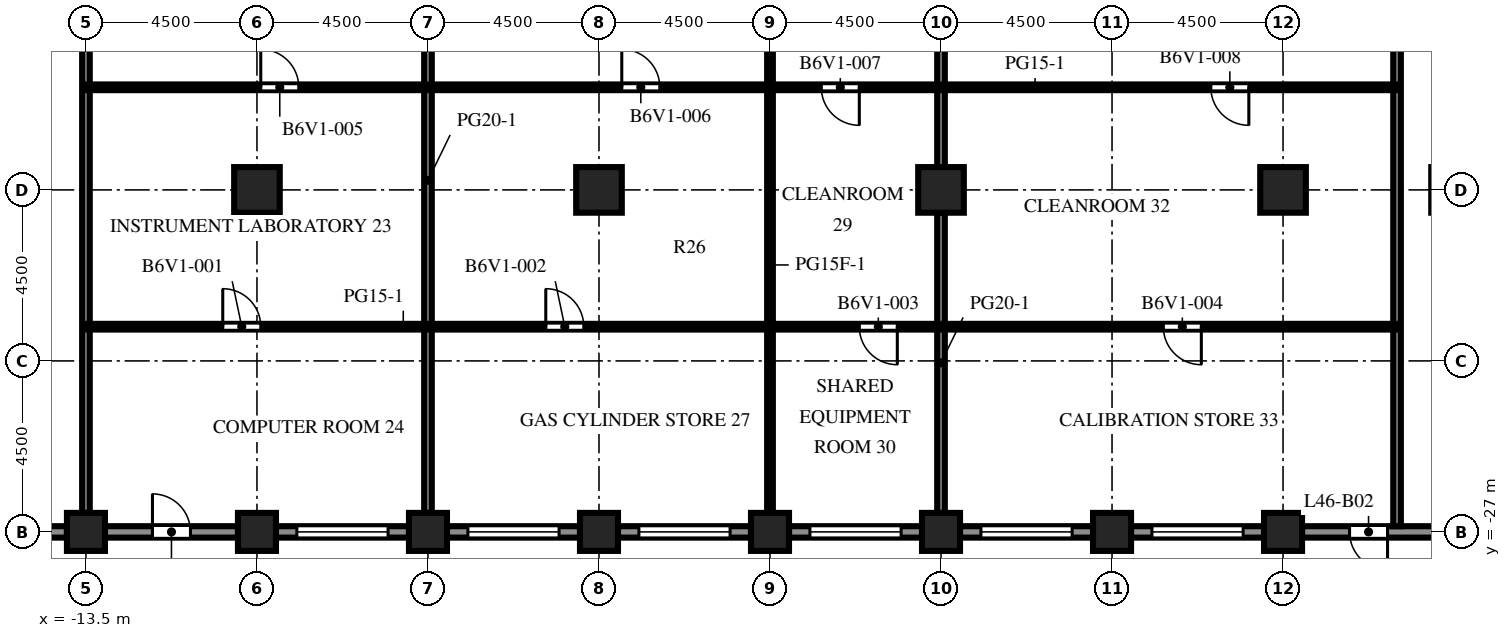
"""IFC4 building model, lengths in metres.
Left out: names, types, materials, properties, quantities, classifications, styles, units other than length and angle.
Written with IfcOpenShell. Run it as: python <this file> out.ifc"""

import sys

from ifc_helpers import new_model, si_unit, direction, frame, frame_2d, origin, origin_2d, place, context, subcontext, project, spatial, rectangle, extrude, element, fill, save


model = new_model("IFC4")
c1 = context("Model", 3, precision=1e-05, world=origin(), true_north=direction((0.0, 1.0)))
c2 = subcontext(c1, "Body", "Model", "MODEL_VIEW")
j1 = project(units=[si_unit("LENGTHUNIT", "METRE"), si_unit("PLANEANGLEUNIT", "RADIAN")], contexts=[c1])
p1 = place(None, origin())
s1 = spatial("IfcSite", under=j1, at=p1, CompositionType="ELEMENT")
p2 = place(p1, origin())
s2 = spatial("IfcBuilding", under=s1, at=p2, CompositionType="ELEMENT")
p3 = place(p2, frame((0.0, 0.0, 203.8)))
s3 = spatial("IfcBuildingStorey", under=s2, at=p3, CompositionType="ELEMENT", Elevation=203.8)
for number, where, z_axis, x_axis in (
    (1, (-13.5, -27.0, 0.0), (0.0, 0.0, 1.0), (1.0, 0.0, 0.0)),
    (2, (-9.0, -27.0, 0.0), (0.0, 0.0, 1.0), (1.0, 0.0, 0.0)),
    (3, (-4.5, -27.0, 0.0), (0.0, 0.0, 1.0), (1.0, 0.0, 0.0)),
    (4, (0.0, -27.0, 0.0), (0.0, 0.0, 1.0), (1.0, 0.0, 0.0)),
    (5, (4.5, -27.0, 0.0), (0.0, 0.0, 1.0), (1.0, 0.0, 0.0)),
    (6, (9.0, -27.0, 0.0), (0.0, 0.0, 1.0), (1.0, 0.0, 0.0)),
    (7, (13.5, -27.0, 0.0), (0.0, 0.0, 1.0), (1.0, 0.0, 0.0)),
    (8, (18.0, -27.0, 0.0), (0.0, 0.0, 1.0), (1.0, 0.0, 0.0)),
):
    element("IfcColumn", number, at=place(p3, frame(where, z_axis=z_axis, x_axis=x_axis)), inside=s3, PredefinedType="COLUMN", context=c2, shape_type="SweptSolid", body=[
        extrude(rectangle(XDim=1.0, YDim=1.0, at=origin_2d()), origin(), (0.0, 0.0, 1.0), 4.1),
    ])
for number, where, z_axis, x_axis in (
    (9, (-9.0, -18.0, 0.0), (0.0, 0.0, 1.0), (1.0, 0.0, 0.0)),
    (10, (0.0, -18.0, 0.0), (0.0, 0.0, 1.0), (1.0, 0.0, 0.0)),
    (11, (9.0, -18.0, 0.0), (0.0, 0.0, 1.0), (1.0, 0.0, 0.0)),
    (12, (18.0, -18.0, 0.0), (0.0, 0.0, 1.0), (1.0, 0.0, 0.0)),
):
    element("IfcColumn", number, at=place(p3, frame(where, z_axis=z_axis, x_axis=x_axis)), inside=s3, PredefinedType="COLUMN", context=c2, shape_type="SweptSolid", body=[
        extrude(rectangle(XDim=1.2, YDim=1.2, at=origin_2d()), origin(), (0.0, 0.0, 1.0), 4.1),
    ])
p4 = place(p3, frame((-14.0, -27.0, 0.0), z_axis=(0.0, 0.0, 1.0), x_axis=(-1.0, 0.0, 0.0)))
e13 = element("IfcWall", 13, at=p4, inside=s3, PredefinedType="SOLIDWALL", context=c2, shape_type="SweptSolid", body=[
    extrude(rectangle(XDim=3.5, YDim=0.3, at=frame_2d((1.75, 0.0))), origin(), (0.0, 0.0, 1.0), 2.85),
])
p5 = place(p4, frame((0.55, 0.0, 0.8)))
e14 = element("IfcOpeningElement", 14, at=p5, cuts=e13, PredefinedType="OPENING", context=c2, shape_type="SweptSolid", body=[
    extrude(rectangle(XDim=2.4, YDim=1.7, at=frame_2d((1.2, 0.85))), frame((0.0, 0.16, 0.0), z_axis=(0.0, -1.0, 0.0), x_axis=(1.0, 0.0, 0.0)), (0.0, 0.0, 1.0), 0.32),
])
p6 = place(p3, frame((-9.5, -27.0, 0.0), z_axis=(0.0, 0.0, 1.0), x_axis=(-1.0, 0.0, 0.0)))
e15 = element("IfcWall", 15, at=p6, inside=s3, PredefinedType="SOLIDWALL", context=c2, shape_type="SweptSolid", body=[
    extrude(rectangle(XDim=3.5, YDim=0.3, at=frame_2d((1.75, 0.0))), origin(), (0.0, 0.0, 1.0), 2.85),
])
p7 = place(p6, frame((1.25, 0.0, 0.0)))
e16 = element("IfcOpeningElement", 16, at=p7, cuts=e15, PredefinedType="OPENING", context=c2, shape_type="SweptSolid", body=[
    extrude(rectangle(XDim=1.0, YDim=2.2, at=frame_2d((0.5, 1.1))), frame((0.0, 0.16, 0.0), z_axis=(0.0, -1.0, 0.0), x_axis=(1.0, 0.0, 0.0)), (0.0, 0.0, 1.0), 0.32),
])
p8 = place(p3, frame((-5.0, -27.0, 0.0), z_axis=(0.0, 0.0, 1.0), x_axis=(-1.0, 0.0, 0.0)))
e17 = element("IfcWall", 17, at=p8, inside=s3, PredefinedType="SOLIDWALL", context=c2, shape_type="SweptSolid", body=[
    extrude(rectangle(XDim=3.5, YDim=0.3, at=frame_2d((1.75, 0.0))), origin(), (0.0, 0.0, 1.0), 2.85),
])
p9 = place(p8, frame((0.55, 0.0, 0.8)))
e18 = element("IfcOpeningElement", 18, at=p9, cuts=e17, PredefinedType="OPENING", context=c2, shape_type="SweptSolid", body=[
    extrude(rectangle(XDim=2.4, YDim=1.7, at=frame_2d((1.2, 0.85))), frame((0.0, 0.16, 0.0), z_axis=(0.0, -1.0, 0.0), x_axis=(1.0, 0.0, 0.0)), (0.0, 0.0, 1.0), 0.32),
])
p10 = place(p3, frame((-0.5, -27.0, 0.0), z_axis=(0.0, 0.0, 1.0), x_axis=(-1.0, 0.0, 0.0)))
e19 = element("IfcWall", 19, at=p10, inside=s3, PredefinedType="SOLIDWALL", context=c2, shape_type="SweptSolid", body=[
    extrude(rectangle(XDim=3.5, YDim=0.3, at=frame_2d((1.75, 0.0))), origin(), (0.0, 0.0, 1.0), 2.85),
])
p11 = place(p10, frame((0.55, 0.0, 0.8)))
e20 = element("IfcOpeningElement", 20, at=p11, cuts=e19, PredefinedType="OPENING", context=c2, shape_type="SweptSolid", body=[
    extrude(rectangle(XDim=2.4, YDim=1.7, at=frame_2d((1.2, 0.85))), frame((0.0, 0.16, 0.0), z_axis=(0.0, -1.0, 0.0), x_axis=(1.0, 0.0, 0.0)), (0.0, 0.0, 1.0), 0.32),
])
p12 = place(p3, frame((4.0, -27.0, 0.0), z_axis=(0.0, 0.0, 1.0), x_axis=(-1.0, 0.0, 0.0)))
e21 = element("IfcWall", 21, at=p12, inside=s3, PredefinedType="SOLIDWALL", context=c2, shape_type="SweptSolid", body=[
    extrude(rectangle(XDim=3.5, YDim=0.3, at=frame_2d((1.75, 0.0))), origin(), (0.0, 0.0, 1.0), 2.85),
])
p13 = place(p12, frame((0.55, 0.0, 0.8)))
e22 = element("IfcOpeningElement", 22, at=p13, cuts=e21, PredefinedType="OPENING", context=c2, shape_type="SweptSolid", body=[
    extrude(rectangle(XDim=2.4, YDim=1.7, at=frame_2d((1.2, 0.85))), frame((0.0, 0.16, 0.0), z_axis=(0.0, -1.0, 0.0), x_axis=(1.0, 0.0, 0.0)), (0.0, 0.0, 1.0), 0.32),
])
p14 = place(p3, frame((8.5, -27.0, 0.0), z_axis=(0.0, 0.0, 1.0), x_axis=(-1.0, 0.0, 0.0)))
e23 = element("IfcWall", 23, at=p14, inside=s3, PredefinedType="SOLIDWALL", context=c2, shape_type="SweptSolid", body=[
    extrude(rectangle(XDim=3.5, YDim=0.3, at=frame_2d((1.75, 0.0))), origin(), (0.0, 0.0, 1.0), 2.85),
])
p15 = place(p14, frame((0.55, 0.0, 0.8)))
e24 = element("IfcOpeningElement", 24, at=p15, cuts=e23, PredefinedType="OPENING", context=c2, shape_type="SweptSolid", body=[
    extrude(rectangle(XDim=2.4, YDim=1.7, at=frame_2d((1.2, 0.85))), frame((0.0, 0.16, 0.0), z_axis=(0.0, -1.0, 0.0), x_axis=(1.0, 0.0, 0.0)), (0.0, 0.0, 1.0), 0.32),
])
p16 = place(p3, frame((13.0, -27.0, 0.0), z_axis=(0.0, 0.0, 1.0), x_axis=(-1.0, 0.0, 0.0)))
e25 = element("IfcWall", 25, at=p16, inside=s3, PredefinedType="SOLIDWALL", context=c2, shape_type="SweptSolid", body=[
    extrude(rectangle(XDim=3.5, YDim=0.3, at=frame_2d((1.75, 0.0))), origin(), (0.0, 0.0, 1.0), 2.85),
])
p17 = place(p16, frame((0.55, 0.0, 0.8)))
e26 = element("IfcOpeningElement", 26, at=p17, cuts=e25, PredefinedType="OPENING", context=c2, shape_type="SweptSolid", body=[
    extrude(rectangle(XDim=2.4, YDim=1.7, at=frame_2d((1.2, 0.85))), frame((0.0, 0.16, 0.0), z_axis=(0.0, -1.0, 0.0), x_axis=(1.0, 0.0, 0.0)), (0.0, 0.0, 1.0), 0.32),
])
p18 = place(p3, frame((17.5, -27.0, 0.0), z_axis=(0.0, 0.0, 1.0), x_axis=(-1.0, 0.0, 0.0)))
e27 = element("IfcWall", 27, at=p18, inside=s3, PredefinedType="SOLIDWALL", context=c2, shape_type="SweptSolid", body=[
    extrude(rectangle(XDim=3.5, YDim=0.3, at=frame_2d((1.75, 0.0))), origin(), (0.0, 0.0, 1.0), 2.85),
])
p19 = place(p18, frame((0.55, 0.0, 0.8)))
e28 = element("IfcOpeningElement", 28, at=p19, cuts=e27, PredefinedType="OPENING", context=c2, shape_type="SweptSolid", body=[
    extrude(rectangle(XDim=2.4, YDim=1.7, at=frame_2d((1.2, 0.85))), frame((0.0, 0.16, 0.0), z_axis=(0.0, -1.0, 0.0), x_axis=(1.0, 0.0, 0.0)), (0.0, 0.0, 1.0), 0.32),
])
p20 = place(p3, frame((22.0, -27.0, 0.0), z_axis=(0.0, 0.0, 1.0), x_axis=(-1.0, 0.0, 0.0)))
e29 = element("IfcWall", 29, at=p20, inside=s3, PredefinedType="SOLIDWALL", context=c2, shape_type="SweptSolid", body=[
    extrude(rectangle(XDim=3.5, YDim=0.3, at=frame_2d((1.75, 0.0))), origin(), (0.0, 0.0, 1.0), 2.85),
])
p21 = place(p20, frame((1.25, 0.0, 0.0)))
e30 = element("IfcOpeningElement", 30, at=p21, cuts=e29, PredefinedType="OPENING", context=c2, shape_type="SweptSolid", body=[
    extrude(rectangle(XDim=1.0, YDim=2.2, at=frame_2d((0.5, 1.1))), frame((0.0, 0.16, 0.0), z_axis=(0.0, -1.0, 0.0), x_axis=(1.0, 0.0, 0.0)), (0.0, 0.0, 1.0), 0.32),
])
p22 = place(p3, frame((-13.5, -26.5, 0.0), z_axis=(0.0, 0.0, 1.0), x_axis=(0.0, 1.0, 0.0)))
e31 = element("IfcWall", 31, at=p22, inside=s3, PredefinedType="PARTITIONING", context=c2, shape_type="SweptSolid", body=[
    extrude(rectangle(XDim=29.75, YDim=0.2, at=frame_2d((14.875, 0.0))), origin(), (0.0, 0.0, 1.0), 3.65),
])
p23 = place(p3, frame((-4.5, -26.5, 0.0), z_axis=(0.0, 0.0, 1.0), x_axis=(0.0, 1.0, 0.0)))
e32 = element("IfcWall", 32, at=p23, inside=s3, PredefinedType="PARTITIONING", context=c2, shape_type="SweptSolid", body=[
    extrude(rectangle(XDim=17.5, YDim=0.2, at=frame_2d((8.75, 0.0))), origin(), (0.0, 0.0, 1.0), 3.65),
])
p24 = place(p3, frame((4.5, -9.0, 0.0), z_axis=(0.0, 0.0, 1.0), x_axis=(0.0, -1.0, 0.0)))
e33 = element("IfcWall", 33, at=p24, inside=s3, PredefinedType="PARTITIONING", context=c2, shape_type="SweptSolid", body=[
    extrude(rectangle(XDim=17.5, YDim=0.15, at=frame_2d((8.75, 0.0))), origin(), (0.0, 0.0, 1.0), 3.65),
])
p25 = place(p24, frame((3.45, 0.0, 0.0)))
e34 = element("IfcOpeningElement", 34, at=p25, cuts=e33, PredefinedType="OPENING", context=c2, shape_type="SweptSolid", body=[
    extrude(rectangle(XDim=1.0, YDim=2.1, at=frame_2d((0.5, 1.05))), frame((0.0, 0.085, 0.0), z_axis=(0.0, -1.0, 0.0), x_axis=(1.0, 0.0, 0.0)), (0.0, 0.0, 1.0), 0.17),
])
p26 = place(p3, frame((9.0, -26.5, 0.0), z_axis=(0.0, 0.0, 1.0), x_axis=(0.0, 1.0, 0.0)))
e35 = element("IfcWall", 35, at=p26, inside=s3, PredefinedType="PARTITIONING", context=c2, shape_type="SweptSolid", body=[
    extrude(rectangle(XDim=7.9, YDim=0.2, at=frame_2d((3.95, 0.0))), origin(), (0.0, 0.0, 1.0), 3.65),
])
p27 = place(p3, frame((9.0, -17.4, 0.0), z_axis=(0.0, 0.0, 1.0), x_axis=(0.0, 1.0, 0.0)))
e36 = element("IfcWall", 36, at=p27, inside=s3, PredefinedType="PARTITIONING", context=c2, shape_type="SweptSolid", body=[
    extrude(rectangle(XDim=8.4, YDim=0.2, at=frame_2d((4.2, 0.0))), origin(), (0.0, 0.0, 1.0), 3.65),
])
p28 = place(p3, frame((21.0, -26.85, 0.0), z_axis=(0.0, 0.0, 1.0), x_axis=(0.0, 1.0, 0.0)))
e37 = element("IfcWall", 37, at=p28, inside=s3, PredefinedType="PARTITIONING", context=c2, shape_type="SweptSolid", body=[
    extrude(rectangle(XDim=30.1, YDim=0.2, at=frame_2d((15.05, 0.0))), origin(), (0.0, 0.0, 1.0), 3.65),
])
p29 = place(p3, frame((21.0, -21.6, 0.0), z_axis=(0.0, 0.0, 1.0), x_axis=(-1.0, 0.0, 0.0)))
e38 = element("IfcWall", 38, at=p29, inside=s3, PredefinedType="PARTITIONING", context=c2, shape_type="SweptSolid", body=[
    extrude(rectangle(XDim=34.5, YDim=0.15, at=frame_2d((17.25, 0.0))), origin(), (0.0, 0.0, 1.0), 3.65),
])
p30 = place(p29, frame((29.9, 0.0, 0.0)))
e39 = element("IfcOpeningElement", 39, at=p30, cuts=e38, PredefinedType="OPENING", context=c2, shape_type="SweptSolid", body=[
    extrude(rectangle(XDim=1.0, YDim=2.1, at=frame_2d((0.5, 1.05))), frame((0.0, 0.085, 0.0), z_axis=(0.0, -1.0, 0.0), x_axis=(1.0, 0.0, 0.0)), (0.0, 0.0, 1.0), 0.17),
])
p31 = place(p29, frame((21.4, 0.0, 0.0)))
e40 = element("IfcOpeningElement", 40, at=p31, cuts=e38, PredefinedType="OPENING", context=c2, shape_type="SweptSolid", body=[
    extrude(rectangle(XDim=1.0, YDim=2.1, at=frame_2d((0.5, 1.05))), frame((0.0, 0.085, 0.0), z_axis=(0.0, -1.0, 0.0), x_axis=(1.0, 0.0, 0.0)), (0.0, 0.0, 1.0), 0.17),
])
p32 = place(p29, frame((13.15, 0.0, 0.0)))
e41 = element("IfcOpeningElement", 41, at=p32, cuts=e38, PredefinedType="OPENING", context=c2, shape_type="SweptSolid", body=[
    extrude(rectangle(XDim=1.0, YDim=2.1, at=frame_2d((0.5, 1.05))), frame((0.0, 0.085, 0.0), z_axis=(0.0, -1.0, 0.0), x_axis=(1.0, 0.0, 0.0)), (0.0, 0.0, 1.0), 0.17),
])
p33 = place(p29, frame((5.15, 0.0, 0.0)))
e42 = element("IfcOpeningElement", 42, at=p33, cuts=e38, PredefinedType="OPENING", context=c2, shape_type="SweptSolid", body=[
    extrude(rectangle(XDim=1.0, YDim=2.1, at=frame_2d((0.5, 1.05))), frame((0.0, 0.085, 0.0), z_axis=(0.0, -1.0, 0.0), x_axis=(1.0, 0.0, 0.0)), (0.0, 0.0, 1.0), 0.17),
])
p34 = place(p3, frame((21.0, -15.3, 0.0), z_axis=(0.0, 0.0, 1.0), x_axis=(-1.0, 0.0, 0.0)))
e43 = element("IfcWall", 43, at=p34, inside=s3, PredefinedType="PARTITIONING", context=c2, shape_type="SweptSolid", body=[
    extrude(rectangle(XDim=34.5, YDim=0.15, at=frame_2d((17.25, 0.0))), origin(), (0.0, 0.0, 1.0), 3.65),
])
p35 = place(p34, frame((28.9, 0.0, 0.0)))
e44 = element("IfcOpeningElement", 44, at=p35, cuts=e43, PredefinedType="OPENING", context=c2, shape_type="SweptSolid", body=[
    extrude(rectangle(XDim=1.0, YDim=2.1, at=frame_2d((0.5, 1.05))), frame((0.0, 0.085, 0.0), z_axis=(0.0, -1.0, 0.0), x_axis=(1.0, 0.0, 0.0)), (0.0, 0.0, 1.0), 0.17),
])
p36 = place(p34, frame((19.4, 0.0, 0.0)))
e45 = element("IfcOpeningElement", 45, at=p36, cuts=e43, PredefinedType="OPENING", context=c2, shape_type="SweptSolid", body=[
    extrude(rectangle(XDim=1.0, YDim=2.1, at=frame_2d((0.5, 1.05))), frame((0.0, 0.085, 0.0), z_axis=(0.0, -1.0, 0.0), x_axis=(1.0, 0.0, 0.0)), (0.0, 0.0, 1.0), 0.17),
])
p37 = place(p34, frame((14.15, 0.0, 0.0)))
e46 = element("IfcOpeningElement", 46, at=p37, cuts=e43, PredefinedType="OPENING", context=c2, shape_type="SweptSolid", body=[
    extrude(rectangle(XDim=1.0, YDim=2.1, at=frame_2d((0.5, 1.05))), frame((0.0, 0.085, 0.0), z_axis=(0.0, -1.0, 0.0), x_axis=(1.0, 0.0, 0.0)), (0.0, 0.0, 1.0), 0.17),
])
p38 = place(p34, frame((3.9, 0.0, 0.0)))
e47 = element("IfcOpeningElement", 47, at=p38, cuts=e43, PredefinedType="OPENING", context=c2, shape_type="SweptSolid", body=[
    extrude(rectangle(XDim=1.0, YDim=2.1, at=frame_2d((0.5, 1.05))), frame((0.0, 0.085, 0.0), z_axis=(0.0, -1.0, 0.0), x_axis=(1.0, 0.0, 0.0)), (0.0, 0.0, 1.0), 0.17),
])
p39 = place(p7, origin())
e48 = element("IfcDoor", 48, at=p39, inside=s3, OperationType="SINGLE_SWING_RIGHT", PredefinedType="DOOR", context=c2, shape_type="SweptSolid", body=[
    extrude(rectangle(XDim=1.0, YDim=2.2, at=frame_2d((0.5, 1.1))), frame((0.0, 0.025, 0.0), z_axis=(0.0, -1.0, 0.0), x_axis=(1.0, 0.0, 0.0)), (0.0, 0.0, 1.0), 0.05),
])
fill(e16, e48)
p40 = place(p9, origin())
e49 = element("IfcWindow", 49, at=p40, inside=s3, PartitioningType="SINGLE_PANEL", PredefinedType="WINDOW", context=c2, shape_type="SweptSolid", body=[
    extrude(rectangle(XDim=2.4, YDim=1.7, at=frame_2d((1.2, 0.85))), frame((0.0, 0.03, 0.0), z_axis=(0.0, -1.0, 0.0), x_axis=(1.0, 0.0, 0.0)), (0.0, 0.0, 1.0), 0.06),
])
fill(e18, e49)
p41 = place(p11, origin())
e50 = element("IfcWindow", 50, at=p41, inside=s3, PartitioningType="SINGLE_PANEL", PredefinedType="WINDOW", context=c2, shape_type="SweptSolid", body=[
    extrude(rectangle(XDim=2.4, YDim=1.7, at=frame_2d((1.2, 0.85))), frame((0.0, 0.03, 0.0), z_axis=(0.0, -1.0, 0.0), x_axis=(1.0, 0.0, 0.0)), (0.0, 0.0, 1.0), 0.06),
])
fill(e20, e50)
p42 = place(p13, origin())
e51 = element("IfcWindow", 51, at=p42, inside=s3, PartitioningType="SINGLE_PANEL", PredefinedType="WINDOW", context=c2, shape_type="SweptSolid", body=[
    extrude(rectangle(XDim=2.4, YDim=1.7, at=frame_2d((1.2, 0.85))), frame((0.0, 0.03, 0.0), z_axis=(0.0, -1.0, 0.0), x_axis=(1.0, 0.0, 0.0)), (0.0, 0.0, 1.0), 0.06),
])
fill(e22, e51)
p43 = place(p15, origin())
e52 = element("IfcWindow", 52, at=p43, inside=s3, PartitioningType="SINGLE_PANEL", PredefinedType="WINDOW", context=c2, shape_type="SweptSolid", body=[
    extrude(rectangle(XDim=2.4, YDim=1.7, at=frame_2d((1.2, 0.85))), frame((0.0, 0.03, 0.0), z_axis=(0.0, -1.0, 0.0), x_axis=(1.0, 0.0, 0.0)), (0.0, 0.0, 1.0), 0.06),
])
fill(e24, e52)
p44 = place(p17, origin())
e53 = element("IfcWindow", 53, at=p44, inside=s3, PartitioningType="SINGLE_PANEL", PredefinedType="WINDOW", context=c2, shape_type="SweptSolid", body=[
    extrude(rectangle(XDim=2.4, YDim=1.7, at=frame_2d((1.2, 0.85))), frame((0.0, 0.03, 0.0), z_axis=(0.0, -1.0, 0.0), x_axis=(1.0, 0.0, 0.0)), (0.0, 0.0, 1.0), 0.06),
])
fill(e26, e53)
p45 = place(p19, origin())
e54 = element("IfcWindow", 54, at=p45, inside=s3, PartitioningType="SINGLE_PANEL", PredefinedType="WINDOW", context=c2, shape_type="SweptSolid", body=[
    extrude(rectangle(XDim=2.4, YDim=1.7, at=frame_2d((1.2, 0.85))), frame((0.0, 0.03, 0.0), z_axis=(0.0, -1.0, 0.0), x_axis=(1.0, 0.0, 0.0)), (0.0, 0.0, 1.0), 0.06),
])
fill(e28, e54)
p46 = place(p21, origin())
e55 = element("IfcDoor", 55, at=p46, inside=s3, OperationType="SINGLE_SWING_LEFT", PredefinedType="DOOR", context=c2, shape_type="SweptSolid", body=[
    extrude(rectangle(XDim=1.0, YDim=2.2, at=frame_2d((0.5, 1.1))), frame((0.0, 0.025, 0.0), z_axis=(0.0, -1.0, 0.0), x_axis=(1.0, 0.0, 0.0)), (0.0, 0.0, 1.0), 0.05),
])
fill(e30, e55)
p47 = place(p30, origin())
e56 = element("IfcDoor", 56, at=p47, inside=s3, OperationType="SINGLE_SWING_RIGHT", PredefinedType="DOOR", context=c2, shape_type="SweptSolid", body=[
    extrude(rectangle(XDim=1.0, YDim=2.1, at=frame_2d((0.5, 1.05))), frame((0.0, 0.025, 0.0), z_axis=(0.0, -1.0, 0.0), x_axis=(1.0, 0.0, 0.0)), (0.0, 0.0, 1.0), 0.05),
])
fill(e39, e56)
p48 = place(p31, origin())
e57 = element("IfcDoor", 57, at=p48, inside=s3, OperationType="SINGLE_SWING_RIGHT", PredefinedType="DOOR", context=c2, shape_type="SweptSolid", body=[
    extrude(rectangle(XDim=1.0, YDim=2.1, at=frame_2d((0.5, 1.05))), frame((0.0, 0.025, 0.0), z_axis=(0.0, -1.0, 0.0), x_axis=(1.0, 0.0, 0.0)), (0.0, 0.0, 1.0), 0.05),
])
fill(e40, e57)
p49 = place(p32, origin())
e58 = element("IfcDoor", 58, at=p49, inside=s3, OperationType="SINGLE_SWING_LEFT", PredefinedType="DOOR", context=c2, shape_type="SweptSolid", body=[
    extrude(rectangle(XDim=1.0, YDim=2.1, at=frame_2d((0.5, 1.05))), frame((0.0, 0.025, 0.0), z_axis=(0.0, -1.0, 0.0), x_axis=(1.0, 0.0, 0.0)), (0.0, 0.0, 1.0), 0.05),
])
fill(e41, e58)
p50 = place(p33, origin())
e59 = element("IfcDoor", 59, at=p50, inside=s3, OperationType="SINGLE_SWING_LEFT", PredefinedType="DOOR", context=c2, shape_type="SweptSolid", body=[
    extrude(rectangle(XDim=1.0, YDim=2.1, at=frame_2d((0.5, 1.05))), frame((0.0, 0.025, 0.0), z_axis=(0.0, -1.0, 0.0), x_axis=(1.0, 0.0, 0.0)), (0.0, 0.0, 1.0), 0.05),
])
fill(e42, e59)
p51 = place(p35, origin())
e60 = element("IfcDoor", 60, at=p51, inside=s3, OperationType="SINGLE_SWING_RIGHT", PredefinedType="DOOR", context=c2, shape_type="SweptSolid", body=[
    extrude(rectangle(XDim=1.0, YDim=2.1, at=frame_2d((0.5, 1.05))), frame((0.0, 0.025, 0.0), z_axis=(0.0, -1.0, 0.0), x_axis=(1.0, 0.0, 0.0)), (0.0, 0.0, 1.0), 0.05),
])
fill(e44, e60)
p52 = place(p36, origin())
e61 = element("IfcDoor", 61, at=p52, inside=s3, OperationType="SINGLE_SWING_RIGHT", PredefinedType="DOOR", context=c2, shape_type="SweptSolid", body=[
    extrude(rectangle(XDim=1.0, YDim=2.1, at=frame_2d((0.5, 1.05))), frame((0.0, 0.025, 0.0), z_axis=(0.0, -1.0, 0.0), x_axis=(1.0, 0.0, 0.0)), (0.0, 0.0, 1.0), 0.05),
])
fill(e45, e61)
p53 = place(p37, origin())
e62 = element("IfcDoor", 62, at=p53, inside=s3, OperationType="SINGLE_SWING_LEFT", PredefinedType="DOOR", context=c2, shape_type="SweptSolid", body=[
    extrude(rectangle(XDim=1.0, YDim=2.1, at=frame_2d((0.5, 1.05))), frame((0.0, 0.025, 0.0), z_axis=(0.0, -1.0, 0.0), x_axis=(1.0, 0.0, 0.0)), (0.0, 0.0, 1.0), 0.05),
])
fill(e46, e62)
p54 = place(p38, origin())
e63 = element("IfcDoor", 63, at=p54, inside=s3, OperationType="SINGLE_SWING_LEFT", PredefinedType="DOOR", context=c2, shape_type="SweptSolid", body=[
    extrude(rectangle(XDim=1.0, YDim=2.1, at=frame_2d((0.5, 1.05))), frame((0.0, 0.025, 0.0), z_axis=(0.0, -1.0, 0.0), x_axis=(1.0, 0.0, 0.0)), (0.0, 0.0, 1.0), 0.05),
])
fill(e47, e63)
save(model, sys.argv[1])
